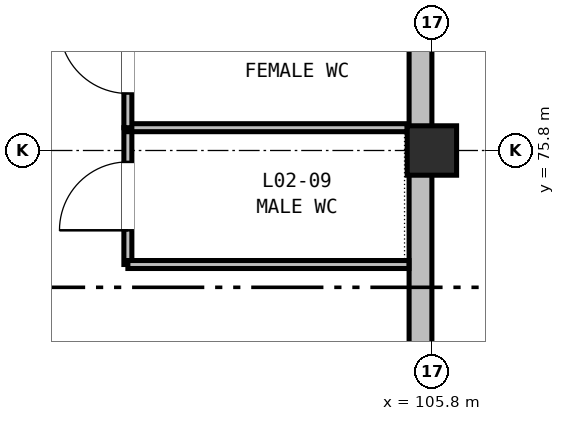
"""IFC4 building model, lengths in metres.
Left out: names, types, materials, properties, quantities, classifications, styles, units other than length and angle.
Written with IfcOpenShell. Run it as: python <this file> out.ifc"""

import sys

from ifc_helpers import new_model, si_unit, direction, frame, frame_2d, origin, origin_2d, place, context, subcontext, project, spatial, rectangle, extrude, element, fill, save


model = new_model("IFC4")
c1 = context("Model", 3, precision=1e-05, world=origin(), true_north=direction((0.0, 1.0)))
c2 = subcontext(c1, "Body", "Model", "MODEL_VIEW")
j1 = project(units=[si_unit("LENGTHUNIT", "METRE"), si_unit("PLANEANGLEUNIT", "RADIAN")], contexts=[c1])
p1 = place(None, origin())
s1 = spatial("IfcSite", under=j1, at=p1, CompositionType="ELEMENT")
p2 = place(p1, origin())
s2 = spatial("IfcBuilding", under=s1, at=p2, CompositionType="ELEMENT")
p3 = place(p2, frame((0.0, 0.0, 10.2)))
s3 = spatial("IfcBuildingStorey", under=s2, at=p3, CompositionType="ELEMENT", Elevation=10.2)
p4 = place(p3, frame((105.8, 75.8, 0.0), z_axis=(0.0, 0.0, 1.0), x_axis=(1.0, 0.0, 0.0)))
e1 = element("IfcColumn", 1, at=p4, inside=s3, PredefinedType="COLUMN", context=c2, shape_type="SweptSolid", body=[
    extrude(rectangle(XDim=0.65, YDim=0.65, at=origin_2d()), origin(), (0.0, 0.0, 1.0), 4.8),
])
p5 = place(p3, frame((105.65, 83.9, 0.0), z_axis=(0.0, 0.0, 1.0), x_axis=(0.0, -1.0, 0.0)))
e2 = element("IfcWall", 2, at=p5, inside=s3, PredefinedType="STANDARD", context=c2, shape_type="SweptSolid", body=[
    extrude(rectangle(XDim=8.1, YDim=0.3, at=frame_2d((4.05, 0.0))), origin(), (0.0, 0.0, 1.0), 3.935),
])
p6 = place(p5, frame((1.262, 0.0, 0.9)))
e3 = element("IfcOpeningElement", 3, at=p6, cuts=e2, PredefinedType="OPENING", context=c2, shape_type="SweptSolid", body=[
    extrude(rectangle(XDim=1.85, YDim=1.6, at=frame_2d((0.925, 0.8))), frame((0.0, 0.16, 0.0), z_axis=(0.0, -1.0, 0.0), x_axis=(1.0, 0.0, 0.0)), (0.0, 0.0, 1.0), 0.32),
])
p7 = place(p3, frame((105.65, 75.8, 0.0), z_axis=(0.0, 0.0, 1.0), x_axis=(0.0, -1.0, 0.0)))
e4 = element("IfcWall", 4, at=p7, inside=s3, PredefinedType="STANDARD", context=c2, shape_type="SweptSolid", body=[
    extrude(rectangle(XDim=3.3, YDim=0.3, at=frame_2d((1.65, 0.0))), origin(), (0.0, 0.0, 1.0), 3.935),
])
p8 = place(p3, frame((101.8, 74.3, 0.0), z_axis=(0.0, 0.0, 1.0), x_axis=(0.0, 1.0, 0.0)))
e5 = element("IfcWall", 5, at=p8, inside=s3, PredefinedType="PARTITIONING", context=c2, shape_type="SweptSolid", body=[
    extrude(rectangle(XDim=1.8, YDim=0.105, at=frame_2d((0.9, 0.0))), origin(), (0.0, 0.0, 1.0), 4.135),
])
p9 = place(p8, frame((0.45, 0.0, 0.0)))
e6 = element("IfcOpeningElement", 6, at=p9, cuts=e5, PredefinedType="OPENING", context=c2, shape_type="SweptSolid", body=[
    extrude(rectangle(XDim=0.9, YDim=2.02, at=frame_2d((0.45, 1.01))), frame((0.0, 0.062, 0.0), z_axis=(0.0, -1.0, 0.0), x_axis=(1.0, 0.0, 0.0)), (0.0, 0.0, 1.0), 0.125),
])
p10 = place(p3, frame((101.8, 76.1, 0.0), z_axis=(0.0, 0.0, 1.0), x_axis=(1.0, 0.0, 0.0)))
e7 = element("IfcWall", 7, at=p10, inside=s3, PredefinedType="PARTITIONING", context=c2, shape_type="SweptSolid", body=[
    extrude(rectangle(XDim=3.675, YDim=0.105, at=frame_2d((1.837, 0.0))), origin(), (0.0, 0.0, 1.0), 3.935),
])
p11 = place(p3, frame((105.498, 74.3, 0.0), z_axis=(0.0, 0.0, 1.0), x_axis=(-1.0, 0.0, 0.0)))
e8 = element("IfcWall", 8, at=p11, inside=s3, PredefinedType="PARTITIONING", context=c2, shape_type="SweptSolid", body=[
    extrude(rectangle(XDim=3.698, YDim=0.105, at=frame_2d((1.849, 0.0))), origin(), (0.0, 0.0, 1.0), 4.495),
])
p12 = place(p3, frame((101.8, 76.1, 0.0), z_axis=(0.0, 0.0, 1.0), x_axis=(0.0, 1.0, 0.0)))
e9 = element("IfcWall", 9, at=p12, inside=s3, PredefinedType="PARTITIONING", context=c2, shape_type="SweptSolid", body=[
    extrude(rectangle(XDim=1.8, YDim=0.105, at=frame_2d((0.9, 0.0))), origin(), (0.0, 0.0, 1.0), 4.135),
])
p13 = place(p12, frame((0.45, 0.0, 0.0)))
e10 = element("IfcOpeningElement", 10, at=p13, cuts=e9, PredefinedType="OPENING", context=c2, shape_type="SweptSolid", body=[
    extrude(rectangle(XDim=0.9, YDim=2.02, at=frame_2d((0.45, 1.01))), frame((0.0, 0.062, 0.0), z_axis=(0.0, -1.0, 0.0), x_axis=(1.0, 0.0, 0.0)), (0.0, 0.0, 1.0), 0.125),
])
p14 = place(p9, origin())
e11 = element("IfcDoor", 11, at=p14, inside=s3, OperationType="SINGLE_SWING_LEFT", PredefinedType="DOOR", context=c2, shape_type="SweptSolid", body=[
    extrude(rectangle(XDim=0.9, YDim=2.02, at=frame_2d((0.45, 1.01))), frame((0.0, 0.025, 0.0), z_axis=(0.0, -1.0, 0.0), x_axis=(1.0, 0.0, 0.0)), (0.0, 0.0, 1.0), 0.05),
])
fill(e6, e11)
p15 = place(p13, origin())
e12 = element("IfcDoor", 12, at=p15, inside=s3, OperationType="SINGLE_SWING_RIGHT", PredefinedType="DOOR", context=c2, shape_type="SweptSolid", body=[
    extrude(rectangle(XDim=0.9, YDim=2.02, at=frame_2d((0.45, 1.01))), frame((0.0, 0.025, 0.0), z_axis=(0.0, -1.0, 0.0), x_axis=(1.0, 0.0, 0.0)), (0.0, 0.0, 1.0), 0.05),
])
fill(e10, e12)
save(model, sys.argv[1])
